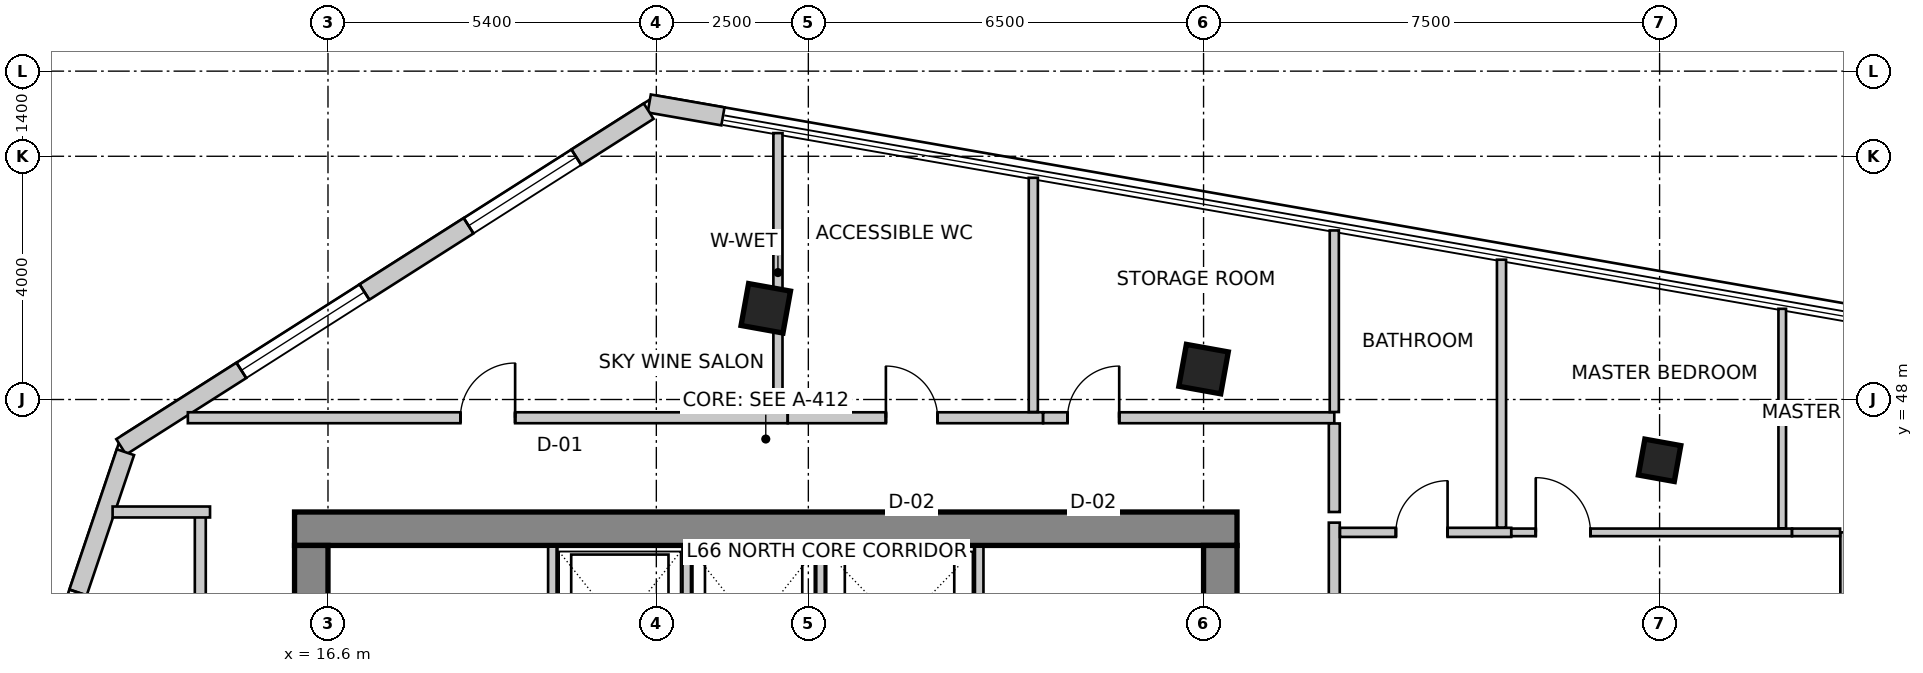
"""IFC4 building model, lengths in metres.
Left out: names, types, materials, properties, quantities, classifications, styles, units other than length and angle.
Written with IfcOpenShell. Run it as: python <this file> out.ifc"""

import sys

from ifc_helpers import new_model, si_unit, direction, frame, frame_2d, origin, origin_2d, place, context, subcontext, project, spatial, rectangle, extrude, source, transform, mapped, element, fill, save


model = new_model("IFC4")
c1 = context("Model", 3, precision=1e-05, world=origin(), true_north=direction((0.0, 1.0)))
c2 = subcontext(c1, "Body", "Model", "MODEL_VIEW")
j1 = project(units=[si_unit("LENGTHUNIT", "METRE"), si_unit("PLANEANGLEUNIT", "RADIAN")], contexts=[c1])
p1 = place(None, origin())
s1 = spatial("IfcSite", under=j1, at=p1, CompositionType="ELEMENT")
p2 = place(p1, origin())
s2 = spatial("IfcBuilding", under=s1, at=p2, CompositionType="ELEMENT")
p3 = place(p2, frame((0.0, 0.0, 260.1)))
s3 = spatial("IfcBuildingStorey", under=s2, at=p3, CompositionType="ELEMENT", Elevation=260.1)
p4 = place(p3, frame((16.05, 45.875, 0.0), z_axis=(0.0, 0.0, 1.0), x_axis=(1.0, 0.0, 0.0)))
e1 = element("IfcWall", 1, at=p4, inside=s3, PredefinedType="SHEAR", context=c2, shape_type="SweptSolid", body=[
    extrude(rectangle(XDim=15.5, YDim=0.55, at=frame_2d((7.75, 0.0))), origin(), (0.0, 0.0, 1.0), 3.6),
])
p5 = place(p3, frame((16.325, 34.2, 0.0), z_axis=(0.0, 0.0, 1.0), x_axis=(0.0, 1.0, 0.0)))
e2 = element("IfcWall", 2, at=p5, inside=s3, PredefinedType="SHEAR", context=c2, shape_type="SweptSolid", body=[
    extrude(rectangle(XDim=11.4, YDim=0.55, at=frame_2d((5.7, 0.0))), origin(), (0.0, 0.0, 1.0), 3.6),
])
m1 = source(origin(), c2, "Body", "SweptSolid", [
    extrude(rectangle(XDim=1.1, YDim=2.15, at=frame_2d((0.55, 1.075))), frame((0.0, 0.285, 0.0), z_axis=(0.0, -1.0, 0.0), x_axis=(1.0, 0.0, 0.0)), (0.0, 0.0, 1.0), 0.57),
])
p6 = place(p5, frame((7.15, 0.0, 0.0)))
e3 = element("IfcOpeningElement", 3, at=p6, cuts=e2, PredefinedType="OPENING", context=c2, shape_type="MappedRepresentation", body=[
    mapped(m1, transform((0.0, 0.0, 0.0), scale=1.0)),
])
p7 = place(p3, frame((31.275, 34.2, 0.0), z_axis=(0.0, 0.0, 1.0), x_axis=(0.0, 1.0, 0.0)))
e4 = element("IfcWall", 4, at=p7, inside=s3, PredefinedType="SHEAR", context=c2, shape_type="SweptSolid", body=[
    extrude(rectangle(XDim=11.4, YDim=0.55, at=frame_2d((5.7, 0.0))), origin(), (0.0, 0.0, 1.0), 3.6),
])
p8 = place(p7, frame((7.35, 0.0, 0.0)))
e5 = element("IfcOpeningElement", 5, at=p8, cuts=e4, PredefinedType="OPENING", context=c2, shape_type="MappedRepresentation", body=[
    mapped(m1, transform((0.0, 0.0, 0.0), scale=1.0)),
])
m2 = source(origin(), c2, "Body", "SweptSolid", [
    extrude(rectangle(XDim=0.7, YDim=0.7, at=origin_2d()), origin(), (0.0, 0.0, 1.0), 3.6),
])
for number, where, z_axis, x_axis in (
    (6, (23.8, 49.5, 0.0), (0.0, 0.0, 1.0), (0.984, -0.177, 0.0)),
    (7, (31.0, 48.5, 0.0), (0.0, 0.0, 1.0), (0.984, -0.177, 0.0)),
):
    element("IfcColumn", number, at=place(p3, frame(where, z_axis=z_axis, x_axis=x_axis)), inside=s3, PredefinedType="COLUMN", context=c2, shape_type="MappedRepresentation", body=[
        mapped(m2, transform((0.0, 0.0, 0.0), scale=1.0)),
    ])
m3 = source(origin(), c2, "Body", "SweptSolid", [
    extrude(rectangle(XDim=0.6, YDim=0.6, at=origin_2d()), origin(), (0.0, 0.0, 1.0), 3.6),
])
p9 = place(p3, frame((38.5, 47.0, 0.0), z_axis=(0.0, 0.0, 1.0), x_axis=(0.984195607969, -0.17708474032, 0.0)))
e8 = element("IfcColumn", 8, at=p9, inside=s3, PredefinedType="COLUMN", context=c2, shape_type="MappedRepresentation", body=[
    mapped(m3, transform((0.0, 0.0, 0.0), scale=1.0)),
])
p10 = place(p3, frame((23.095, 52.656, 0.0), z_axis=(0.0, 0.0, 1.0), x_axis=(-0.985008549623, 0.172505527937, 0.0)))
e9 = element("IfcWall", 9, at=p10, inside=s3, PredefinedType="SOLIDWALL", context=c2, shape_type="SweptSolid", body=[
    extrude(rectangle(XDim=1.23, YDim=0.3, at=frame_2d((0.615, 0.0))), origin(), (0.0, 0.0, 1.0), 3.35),
])
p11 = place(p3, frame((21.874, 52.742, 0.0), z_axis=(0.0, 0.0, 1.0), x_axis=(-0.84365659959, -0.536883173482, 0.0)))
e10 = element("IfcWall", 10, at=p11, inside=s3, PredefinedType="SOLIDWALL", context=c2, shape_type="SweptSolid", body=[
    extrude(rectangle(XDim=10.283, YDim=0.3, at=frame_2d((5.142, 0.0))), origin(), (0.0, 0.0, 1.0), 3.35),
])
m4 = source(origin(), c2, "Body", "SweptSolid", [
    extrude(rectangle(XDim=2.1, YDim=2.0, at=frame_2d((1.05, 1.0))), frame((0.0, 0.16, 0.0), z_axis=(0.0, -1.0, 0.0), x_axis=(1.0, 0.0, 0.0)), (0.0, 0.0, 1.0), 0.32),
])
p12 = place(p11, frame((1.41, 0.0, 0.85)))
e11 = element("IfcOpeningElement", 11, at=p12, cuts=e10, PredefinedType="OPENING", context=c2, shape_type="MappedRepresentation", body=[
    mapped(m4, transform((0.0, 0.0, 0.0), scale=1.0)),
])
m5 = source(origin(), c2, "Body", "SweptSolid", [
    extrude(rectangle(XDim=2.4, YDim=2.2, at=frame_2d((1.2, 1.1))), frame((0.0, 0.16, 0.0), z_axis=(0.0, -1.0, 0.0), x_axis=(1.0, 0.0, 0.0)), (0.0, 0.0, 1.0), 0.32),
])
p13 = place(p11, frame((5.54, 0.0, 0.85)))
e12 = element("IfcOpeningElement", 12, at=p13, cuts=e10, PredefinedType="OPENING", context=c2, shape_type="MappedRepresentation", body=[
    mapped(m5, transform((0.0, 0.0, 0.0), scale=1.0)),
])
p14 = place(p3, frame((13.269, 47.134, 0.0), z_axis=(0.0, 0.0, 1.0), x_axis=(-0.3199211297, -0.947444178182, 0.0)))
e13 = element("IfcWall", 13, at=p14, inside=s3, PredefinedType="SOLIDWALL", context=c2, shape_type="SweptSolid", body=[
    extrude(rectangle(XDim=16.132, YDim=0.3, at=frame_2d((8.066, 0.0))), origin(), (0.0, 0.0, 1.0), 3.35),
])
p15 = place(p14, frame((2.435, 0.0, 0.85)))
e14 = element("IfcOpeningElement", 14, at=p15, cuts=e13, PredefinedType="OPENING", context=c2, shape_type="MappedRepresentation", body=[
    mapped(m5, transform((0.0, 0.0, 0.0), scale=1.0)),
])
p16 = place(p14, frame((7.417, 0.0, 0.85)))
e15 = element("IfcOpeningElement", 15, at=p16, cuts=e13, PredefinedType="OPENING", context=c2, shape_type="MappedRepresentation", body=[
    mapped(m4, transform((0.0, 0.0, 0.0), scale=1.0)),
])
p17 = place(p14, frame((12.099, 0.0, 0.85)))
e16 = element("IfcOpeningElement", 16, at=p17, cuts=e13, PredefinedType="OPENING", context=c2, shape_type="MappedRepresentation", body=[
    mapped(m5, transform((0.0, 0.0, 0.0), scale=1.0)),
])
for number, where, z_axis, x_axis in (
    (17, (20.29, 43.28, 0.0), (0.0, 0.0, 1.0), (0.0, 1.0, 0.0)),
    (18, (27.31, 43.28, 0.0), (0.0, 0.0, 1.0), (0.0, 1.0, 0.0)),
):
    element("IfcWall", number, at=place(p3, frame(where, z_axis=z_axis, x_axis=x_axis)), inside=s3, PredefinedType="SOLIDWALL", context=c2, shape_type="SweptSolid", body=[
        extrude(rectangle(XDim=2.3, YDim=0.14, at=frame_2d((1.15, 0.0))), origin(), (0.0, 0.0, 1.0), 3.35),
    ])
for number, where, z_axis, x_axis in (
    (19, (22.5, 43.02, 0.0), (0.0, 0.0, 1.0), (0.0, 1.0, 0.0)),
    (20, (24.7, 43.02, 0.0), (0.0, 0.0, 1.0), (0.0, 1.0, 0.0)),
):
    element("IfcWall", number, at=place(p3, frame(where, z_axis=z_axis, x_axis=x_axis)), inside=s3, PredefinedType="SOLIDWALL", context=c2, shape_type="SweptSolid", body=[
        extrude(rectangle(XDim=2.56, YDim=0.14, at=frame_2d((1.28, 0.0))), origin(), (0.0, 0.0, 1.0), 3.35),
    ])
p18 = place(p3, frame((14.5, 33.744, 0.0), z_axis=(0.0, 0.0, 1.0), x_axis=(0.0, 1.0, 0.0)))
e21 = element("IfcWall", 21, at=p18, inside=s3, PredefinedType="PARTITIONING", context=c2, shape_type="SweptSolid", body=[
    extrude(rectangle(XDim=12.406, YDim=0.18, at=frame_2d((6.203, 0.0))), origin(), (0.0, 0.0, 1.0), 3.35),
])
m6 = source(origin(), c2, "Body", "SweptSolid", [
    extrude(rectangle(XDim=0.9, YDim=2.15, at=frame_2d((0.45, 1.075))), frame((0.0, 0.1, 0.0), z_axis=(0.0, -1.0, 0.0), x_axis=(1.0, 0.0, 0.0)), (0.0, 0.0, 1.0), 0.2),
])
p19 = place(p18, frame((4.37, 0.0, 0.0)))
e22 = element("IfcOpeningElement", 22, at=p19, cuts=e21, PredefinedType="OPENING", context=c2, shape_type="MappedRepresentation", body=[
    mapped(m6, transform((0.0, 0.0, 0.0), scale=1.0)),
])
p20 = place(p3, frame((14.66, 46.15, 0.0), z_axis=(0.0, 0.0, 1.0), x_axis=(-1.0, 0.0, 0.0)))
e23 = element("IfcWall", 23, at=p20, inside=s3, PredefinedType="PARTITIONING", context=c2, shape_type="SweptSolid", body=[
    extrude(rectangle(XDim=1.602, YDim=0.18, at=frame_2d((0.801, 0.0))), origin(), (0.0, 0.0, 1.0), 3.35),
])
p21 = place(p3, frame((14.295, 47.7, 0.0), z_axis=(0.0, 0.0, 1.0), x_axis=(1.0, 0.0, 0.0)))
e24 = element("IfcWall", 24, at=p21, inside=s3, PredefinedType="PARTITIONING", context=c2, shape_type="SweptSolid", body=[
    extrude(rectangle(XDim=9.865, YDim=0.18, at=frame_2d((4.932, 0.0))), origin(), (0.0, 0.0, 1.0), 2.935),
])
p22 = place(p21, frame((4.482, 0.0, 0.0)))
e25 = element("IfcOpeningElement", 25, at=p22, cuts=e24, PredefinedType="OPENING", context=c2, shape_type="MappedRepresentation", body=[
    mapped(m6, transform((0.0, 0.0, 0.0), scale=1.0)),
])
p23 = place(p3, frame((24.162, 47.7, 0.0), z_axis=(0.0, 0.0, 1.0), x_axis=(1.0, 0.0, 0.0)))
e26 = element("IfcWall", 26, at=p23, inside=s3, PredefinedType="PARTITIONING", context=c2, shape_type="SweptSolid", body=[
    extrude(rectangle(XDim=4.198, YDim=0.18, at=frame_2d((2.099, 0.0))), origin(), (0.0, 0.0, 1.0), 3.35),
])
m7 = source(origin(), c2, "Body", "SweptSolid", [
    extrude(rectangle(XDim=0.85, YDim=2.15, at=frame_2d((0.425, 1.075))), frame((0.0, 0.1, 0.0), z_axis=(0.0, -1.0, 0.0), x_axis=(1.0, 0.0, 0.0)), (0.0, 0.0, 1.0), 0.2),
])
p24 = place(p23, frame((1.613, 0.0, 0.0)))
e27 = element("IfcOpeningElement", 27, at=p24, cuts=e26, PredefinedType="OPENING", context=c2, shape_type="MappedRepresentation", body=[
    mapped(m7, transform((0.0, 0.0, 0.0), scale=1.0)),
])
p25 = place(p3, frame((28.362, 47.7, 0.0), z_axis=(0.0, 0.0, 1.0), x_axis=(1.0, 0.0, 0.0)))
e28 = element("IfcWall", 28, at=p25, inside=s3, PredefinedType="PARTITIONING", context=c2, shape_type="SweptSolid", body=[
    extrude(rectangle(XDim=4.788, YDim=0.18, at=frame_2d((2.394, 0.0))), origin(), (0.0, 0.0, 1.0), 2.788),
])
p26 = place(p25, frame((0.401, 0.0, 0.0)))
e29 = element("IfcOpeningElement", 29, at=p26, cuts=e28, PredefinedType="OPENING", context=c2, shape_type="MappedRepresentation", body=[
    mapped(m7, transform((0.0, 0.0, 0.0), scale=1.0)),
])
p27 = place(p3, frame((33.15, 47.606, 0.0), z_axis=(0.0, 0.0, 1.0), x_axis=(0.0, -1.0, 0.0)))
e30 = element("IfcWall", 30, at=p27, inside=s3, PredefinedType="PARTITIONING", context=c2, shape_type="SweptSolid", body=[
    extrude(rectangle(XDim=1.456, YDim=0.18, at=frame_2d((0.728, 0.0))), origin(), (0.0, 0.0, 1.0), 3.35),
])
p28 = place(p3, frame((33.15, 45.975, 0.0), z_axis=(0.0, 0.0, 1.0), x_axis=(0.0, -1.0, 0.0)))
e31 = element("IfcWall", 31, at=p28, inside=s3, PredefinedType="PARTITIONING", context=c2, shape_type="SweptSolid", body=[
    extrude(rectangle(XDim=5.285, YDim=0.18, at=frame_2d((2.643, 0.0))), origin(), (0.0, 0.0, 1.0), 2.788),
])
p29 = place(p3, frame((24.0, 52.381, 0.0), z_axis=(0.0, 0.0, 1.0), x_axis=(0.0, -1.0, 0.0)))
e32 = element("IfcWall", 32, at=p29, inside=s3, PredefinedType="PARTITIONING", context=c2, shape_type="SweptSolid", body=[
    extrude(rectangle(XDim=4.587, YDim=0.15, at=frame_2d((2.293, 0.0))), origin(), (0.0, 0.0, 1.0), 2.642),
])
p30 = place(p3, frame((28.2, 51.646, 0.0), z_axis=(0.0, 0.0, 1.0), x_axis=(0.0, -1.0, 0.0)))
e33 = element("IfcWall", 33, at=p30, inside=s3, PredefinedType="PARTITIONING", context=c2, shape_type="SweptSolid", body=[
    extrude(rectangle(XDim=3.852, YDim=0.15, at=frame_2d((1.926, 0.0))), origin(), (0.0, 0.0, 1.0), 2.642),
])
p31 = place(p3, frame((33.15, 50.78, 0.0), z_axis=(0.0, 0.0, 1.0), x_axis=(0.0, -1.0, 0.0)))
e34 = element("IfcWall", 34, at=p31, inside=s3, PredefinedType="PARTITIONING", context=c2, shape_type="SweptSolid", body=[
    extrude(rectangle(XDim=2.986, YDim=0.15, at=frame_2d((1.493, 0.0))), origin(), (0.0, 0.0, 1.0), 2.642),
])
p32 = place(p3, frame((41.535, 45.815, 0.0), z_axis=(0.0, 0.0, 1.0), x_axis=(0.0, -1.0, 0.0)))
e35 = element("IfcWall", 35, at=p32, inside=s3, PredefinedType="PARTITIONING", context=c2, shape_type="SweptSolid", body=[
    extrude(rectangle(XDim=4.871, YDim=0.125, at=frame_2d((2.436, 0.0))), origin(), (0.0, 0.0, 1.0), 3.35),
])
m8 = source(origin(), c2, "Body", "SweptSolid", [
    extrude(rectangle(XDim=0.85, YDim=2.15, at=frame_2d((0.425, 1.075))), frame((0.0, 0.073, 0.0), z_axis=(0.0, -1.0, 0.0), x_axis=(1.0, 0.0, 0.0)), (0.0, 0.0, 1.0), 0.145),
])
p33 = place(p32, frame((2.01, 0.0, 0.0)))
e36 = element("IfcOpeningElement", 36, at=p33, cuts=e35, PredefinedType="OPENING", context=c2, shape_type="MappedRepresentation", body=[
    mapped(m8, transform((0.0, 0.0, 0.0), scale=1.0)),
])
p34 = place(p3, frame((33.244, 45.815, 0.0), z_axis=(0.0, 0.0, 1.0), x_axis=(1.0, 0.0, 0.0)))
e37 = element("IfcWall", 37, at=p34, inside=s3, PredefinedType="PARTITIONING", context=c2, shape_type="SweptSolid", body=[
    extrude(rectangle(XDim=2.816, YDim=0.15, at=frame_2d((1.408, 0.0))), origin(), (0.0, 0.0, 1.0), 2.788),
])
m9 = source(origin(), c2, "Body", "SweptSolid", [
    extrude(rectangle(XDim=0.85, YDim=2.15, at=frame_2d((0.425, 1.075))), frame((0.0, 0.085, 0.0), z_axis=(0.0, -1.0, 0.0), x_axis=(1.0, 0.0, 0.0)), (0.0, 0.0, 1.0), 0.17),
])
p35 = place(p34, frame((0.919, 0.0, 0.0)))
e38 = element("IfcOpeningElement", 38, at=p35, cuts=e37, PredefinedType="OPENING", context=c2, shape_type="MappedRepresentation", body=[
    mapped(m9, transform((0.0, 0.0, 0.0), scale=1.0)),
])
p36 = place(p3, frame((36.062, 45.815, 0.0), z_axis=(0.0, 0.0, 1.0), x_axis=(1.0, 0.0, 0.0)))
e39 = element("IfcWall", 39, at=p36, inside=s3, PredefinedType="PARTITIONING", context=c2, shape_type="SweptSolid", body=[
    extrude(rectangle(XDim=4.615, YDim=0.125, at=frame_2d((2.308, 0.0))), origin(), (0.0, 0.0, 1.0), 2.979),
])
m10 = source(origin(), c2, "Body", "SweptSolid", [
    extrude(rectangle(XDim=0.9, YDim=2.15, at=frame_2d((0.45, 1.075))), frame((0.0, 0.073, 0.0), z_axis=(0.0, -1.0, 0.0), x_axis=(1.0, 0.0, 0.0)), (0.0, 0.0, 1.0), 0.145),
])
p37 = place(p36, frame((0.401, 0.0, 0.0)))
e40 = element("IfcOpeningElement", 40, at=p37, cuts=e39, PredefinedType="OPENING", context=c2, shape_type="MappedRepresentation", body=[
    mapped(m10, transform((0.0, 0.0, 0.0), scale=1.0)),
])
p38 = place(p3, frame((40.679, 45.815, 0.0), z_axis=(0.0, 0.0, 1.0), x_axis=(1.0, 0.0, 0.0)))
e41 = element("IfcWall", 41, at=p38, inside=s3, PredefinedType="PARTITIONING", context=c2, shape_type="SweptSolid", body=[
    extrude(rectangle(XDim=0.79, YDim=0.125, at=frame_2d((0.395, 0.0))), origin(), (0.0, 0.0, 1.0), 3.35),
])
p39 = place(p3, frame((35.9, 50.299, 0.0), z_axis=(0.0, 0.0, 1.0), x_axis=(0.0, -1.0, 0.0)))
e42 = element("IfcWall", 42, at=p39, inside=s3, PredefinedType="PARTITIONING", context=c2, shape_type="SweptSolid", body=[
    extrude(rectangle(XDim=4.405, YDim=0.15, at=frame_2d((2.203, 0.0))), origin(), (0.0, 0.0, 1.0), 2.642),
])
p40 = place(p3, frame((40.517, 49.491, 0.0), z_axis=(0.0, 0.0, 1.0), x_axis=(0.0, -1.0, 0.0)))
e43 = element("IfcWall", 43, at=p40, inside=s3, PredefinedType="PARTITIONING", context=c2, shape_type="SweptSolid", body=[
    extrude(rectangle(XDim=3.61, YDim=0.125, at=frame_2d((1.805, 0.0))), origin(), (0.0, 0.0, 1.0), 3.35),
])
m11 = source(origin(), c2, "Body", "SweptSolid", [
    extrude(rectangle(XDim=2.1, YDim=2.0, at=frame_2d((1.05, 1.0))), frame((0.0, -0.015, 0.0), z_axis=(0.0, -1.0, 0.0), x_axis=(1.0, 0.0, 0.0)), (0.0, 0.0, 1.0), 0.06),
])
p41 = place(p12, origin())
e44 = element("IfcWindow", 44, at=p41, inside=s3, PartitioningType="SINGLE_PANEL", PredefinedType="WINDOW", context=c2, shape_type="MappedRepresentation", body=[
    mapped(m11, transform((0.0, 0.0, 0.0), scale=1.0)),
])
fill(e11, e44)
m12 = source(origin(), c2, "Body", "SweptSolid", [
    extrude(rectangle(XDim=2.4, YDim=2.2, at=frame_2d((1.2, 1.1))), frame((0.0, -0.015, 0.0), z_axis=(0.0, -1.0, 0.0), x_axis=(1.0, 0.0, 0.0)), (0.0, 0.0, 1.0), 0.06),
])
p42 = place(p13, origin())
e45 = element("IfcWindow", 45, at=p42, inside=s3, PartitioningType="SINGLE_PANEL", PredefinedType="WINDOW", context=c2, shape_type="MappedRepresentation", body=[
    mapped(m12, transform((0.0, 0.0, 0.0), scale=1.0)),
])
fill(e12, e45)
p43 = place(p15, origin())
e46 = element("IfcWindow", 46, at=p43, inside=s3, PartitioningType="SINGLE_PANEL", PredefinedType="WINDOW", context=c2, shape_type="MappedRepresentation", body=[
    mapped(m12, transform((0.0, 0.0, 0.0), scale=1.0)),
])
fill(e14, e46)
m13 = source(origin(), c2, "Body", "SweptSolid", [
    extrude(rectangle(XDim=0.9, YDim=2.15, at=frame_2d((0.45, 1.075))), frame((0.0, 0.025, 0.0), z_axis=(0.0, -1.0, 0.0), x_axis=(1.0, 0.0, 0.0)), (0.0, 0.0, 1.0), 0.05),
])
p44 = place(p22, origin())
e47 = element("IfcDoor", 47, at=p44, inside=s3, OperationType="SINGLE_SWING_RIGHT", PredefinedType="DOOR", context=c2, shape_type="MappedRepresentation", body=[
    mapped(m13, transform((0.0, 0.0, 0.0), scale=1.0)),
])
fill(e25, e47)
m14 = source(origin(), c2, "Body", "SweptSolid", [
    extrude(rectangle(XDim=0.85, YDim=2.15, at=frame_2d((0.425, 1.075))), frame((0.0, 0.025, 0.0), z_axis=(0.0, -1.0, 0.0), x_axis=(1.0, 0.0, 0.0)), (0.0, 0.0, 1.0), 0.05),
])
p45 = place(p24, origin())
e48 = element("IfcDoor", 48, at=p45, inside=s3, OperationType="SINGLE_SWING_LEFT", PredefinedType="DOOR", context=c2, shape_type="MappedRepresentation", body=[
    mapped(m14, transform((0.0, 0.0, 0.0), scale=1.0)),
])
fill(e27, e48)
p46 = place(p26, origin())
e49 = element("IfcDoor", 49, at=p46, inside=s3, OperationType="SINGLE_SWING_RIGHT", PredefinedType="DOOR", context=c2, shape_type="MappedRepresentation", body=[
    mapped(m14, transform((0.0, 0.0, 0.0), scale=1.0)),
])
fill(e29, e49)
p47 = place(p35, origin())
e50 = element("IfcDoor", 50, at=p47, inside=s3, OperationType="SINGLE_SWING_RIGHT", PredefinedType="DOOR", context=c2, shape_type="MappedRepresentation", body=[
    mapped(m14, transform((0.0, 0.0, 0.0), scale=1.0)),
])
fill(e38, e50)
p48 = place(p37, origin())
e51 = element("IfcDoor", 51, at=p48, inside=s3, OperationType="SINGLE_SWING_LEFT", PredefinedType="DOOR", context=c2, shape_type="MappedRepresentation", body=[
    mapped(m13, transform((0.0, 0.0, 0.0), scale=1.0)),
])
fill(e40, e51)
save(model, sys.argv[1])
